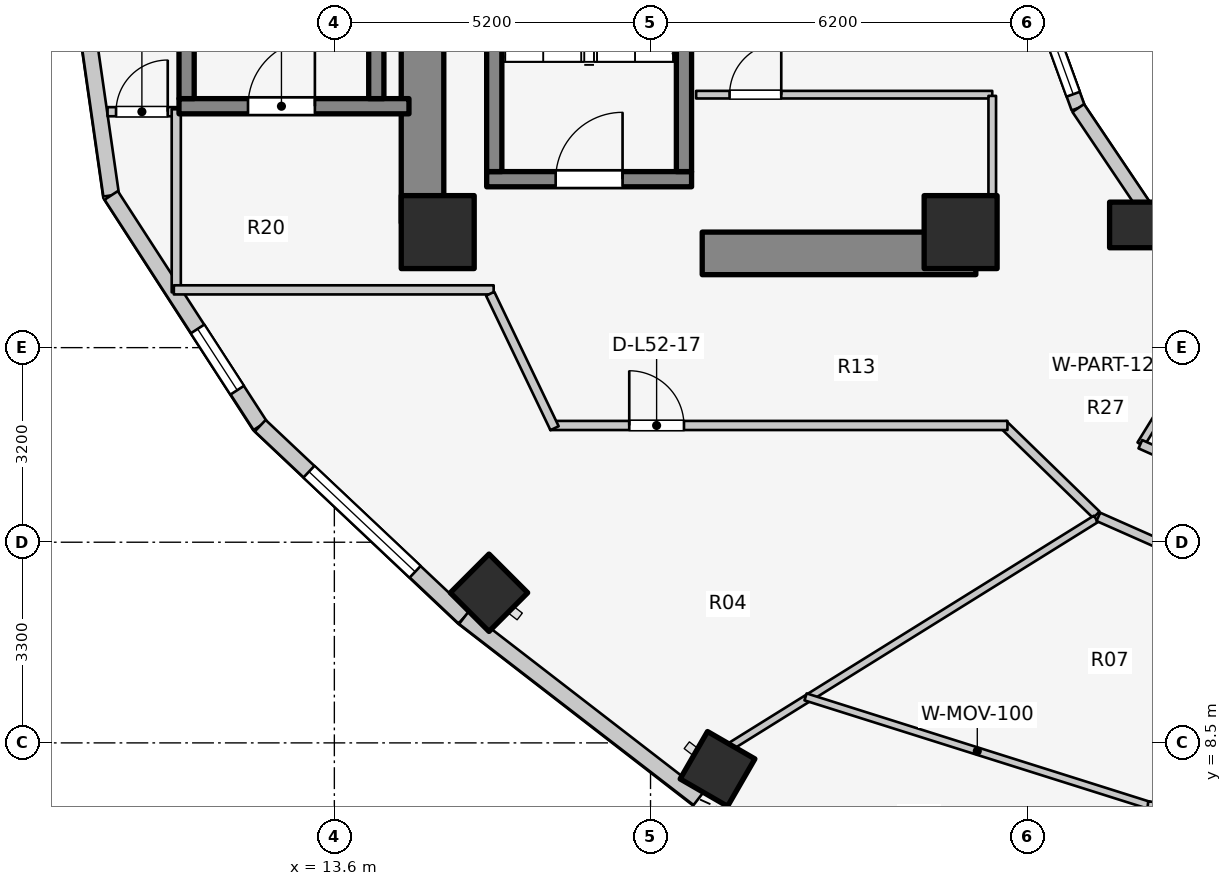
"""IFC4 building model, lengths in metres.
Left out: names, types, materials, properties, quantities, classifications, styles, units other than length and angle.
Written with IfcOpenShell. Run it as: python <this file> out.ifc"""

import sys

from ifc_helpers import new_model, si_unit, direction, frame, frame_2d, origin, origin_2d, place, context, subcontext, project, spatial, rectangle, extrude, element, fill, save


model = new_model("IFC4")
c1 = context("Model", 3, precision=1e-05, world=origin(), true_north=direction((0.0, 1.0)))
c2 = subcontext(c1, "Body", "Model", "MODEL_VIEW")
j1 = project(units=[si_unit("LENGTHUNIT", "METRE"), si_unit("PLANEANGLEUNIT", "RADIAN")], contexts=[c1])
p1 = place(None, origin())
s1 = spatial("IfcSite", under=j1, at=p1, CompositionType="ELEMENT")
p2 = place(p1, origin())
s2 = spatial("IfcBuilding", under=s1, at=p2, CompositionType="ELEMENT")
p3 = place(p2, frame((0.0, 0.0, 171.5)))
s3 = spatial("IfcBuildingStorey", under=s2, at=p3, CompositionType="ELEMENT", Elevation=171.5)
p4 = place(p3, frame((15.05, 17.05, 0.0), z_axis=(0.0, 0.0, 1.0), x_axis=(0.0, 1.0, 0.0)))
e1 = element("IfcWall", 1, at=p4, inside=s3, PredefinedType="SHEAR", context=c2, shape_type="SweptSolid", body=[
    extrude(rectangle(XDim=12.8, YDim=0.7, at=frame_2d((6.4, 0.0))), origin(), (0.0, 0.0, 1.0), 3.1),
])
p5 = place(p3, frame((19.65, 16.55, 0.0), z_axis=(0.0, 0.0, 1.0), x_axis=(1.0, 0.0, 0.0)))
e2 = element("IfcWall", 2, at=p5, inside=s3, PredefinedType="SHEAR", context=c2, shape_type="SweptSolid", body=[
    extrude(rectangle(XDim=4.5, YDim=0.7, at=frame_2d((2.25, 0.0))), origin(), (0.0, 0.0, 1.0), 3.1),
])
p6 = place(p3, frame((16.105, 17.77, 0.0), z_axis=(0.0, 0.0, 1.0), x_axis=(1.0, 0.0, 0.0)))
e3 = element("IfcWall", 3, at=p6, inside=s3, PredefinedType="SOLIDWALL", context=c2, shape_type="SweptSolid", body=[
    extrude(rectangle(XDim=3.37, YDim=0.25, at=frame_2d((1.685, 0.0))), origin(), (0.0, 0.0, 1.0), 3.1),
])
p7 = place(p6, frame((1.135, 0.0, 0.0)))
e4 = element("IfcOpeningElement", 4, at=p7, cuts=e3, PredefinedType="OPENING", context=c2, shape_type="SweptSolid", body=[
    extrude(rectangle(XDim=1.1, YDim=2.1, at=frame_2d((0.55, 1.05))), frame((0.0, 0.135, 0.0), z_axis=(0.0, -1.0, 0.0), x_axis=(1.0, 0.0, 0.0)), (0.0, 0.0, 1.0), 0.27),
])
for number, where, z_axis, x_axis in (
    (5, (16.23, 17.895, 0.0), (0.0, 0.0, 1.0), (0.0, 1.0, 0.0)),
    (6, (19.35, 17.895, 0.0), (0.0, 0.0, 1.0), (0.0, 1.0, 0.0)),
):
    element("IfcWall", number, at=place(p3, frame(where, z_axis=z_axis, x_axis=x_axis)), inside=s3, PredefinedType="SOLIDWALL", context=c2, shape_type="SweptSolid", body=[
        extrude(rectangle(XDim=7.81, YDim=0.25, at=frame_2d((3.905, 0.0))), origin(), (0.0, 0.0, 1.0), 3.1),
    ])
p8 = place(p3, frame((11.045, 18.97, 0.0), z_axis=(0.0, 0.0, 1.0), x_axis=(1.0, 0.0, 0.0)))
e7 = element("IfcWall", 7, at=p8, inside=s3, PredefinedType="SOLIDWALL", context=c2, shape_type="SweptSolid", body=[
    extrude(rectangle(XDim=3.782, YDim=0.25, at=frame_2d((1.891, 0.0))), origin(), (0.0, 0.0, 1.0), 3.1),
])
p9 = place(p8, frame((1.135, 0.0, 0.0)))
e8 = element("IfcOpeningElement", 8, at=p9, cuts=e7, PredefinedType="OPENING", context=c2, shape_type="SweptSolid", body=[
    extrude(rectangle(XDim=1.1, YDim=2.1, at=frame_2d((0.55, 1.05))), frame((0.0, 0.135, 0.0), z_axis=(0.0, -1.0, 0.0), x_axis=(1.0, 0.0, 0.0)), (0.0, 0.0, 1.0), 0.27),
])
for number, where, z_axis, x_axis in (
    (9, (11.17, 19.095, 0.0), (0.0, 0.0, 1.0), (0.0, 1.0, 0.0)),
    (10, (14.29, 19.095, 0.0), (0.0, 0.0, 1.0), (0.0, 1.0, 0.0)),
):
    element("IfcWall", number, at=place(p3, frame(where, z_axis=z_axis, x_axis=x_axis)), inside=s3, PredefinedType="SOLIDWALL", context=c2, shape_type="SweptSolid", body=[
        extrude(rectangle(XDim=7.81, YDim=0.25, at=frame_2d((3.905, 0.0))), origin(), (0.0, 0.0, 1.0), 3.1),
    ])
for number, where, z_axis, x_axis in (
    (11, (15.3, 16.9, 0.0), (0.0, 0.0, 1.0), (1.0, 0.0, 0.0)),
    (12, (23.9, 16.9, 0.0), (0.0, 0.0, 1.0), (1.0, 0.0, 0.0)),
):
    element("IfcColumn", number, at=place(p3, frame(where, z_axis=z_axis, x_axis=x_axis)), inside=s3, PredefinedType="COLUMN", context=c2, shape_type="SweptSolid", body=[
        extrude(rectangle(XDim=1.2, YDim=1.2, at=origin_2d()), origin(), (0.0, 0.0, 1.0), 3.1),
    ])
p10 = place(p3, frame((26.725, 17.018, 0.0), z_axis=(0.0, 0.0, 1.0), x_axis=(1.0, 0.0, 0.0)))
e13 = element("IfcColumn", 13, at=p10, inside=s3, PredefinedType="COLUMN", context=c2, shape_type="SweptSolid", body=[
    extrude(rectangle(XDim=0.75, YDim=0.75, at=origin_2d()), origin(), (0.0, 0.0, 1.0), 3.1),
])
for number, where, z_axis, x_axis in (
    (14, (16.143, 10.969, 0.0), (0.0, 0.0, 1.0), (-0.707, -0.707, 0.0)),
    (15, (19.902, 8.072, 0.0), (0.0, 0.0, 1.0), (-0.5, -0.866, 0.0)),
):
    element("IfcColumn", number, at=place(p3, frame(where, z_axis=z_axis, x_axis=x_axis)), inside=s3, PredefinedType="COLUMN", context=c2, shape_type="SweptSolid", body=[
        extrude(rectangle(XDim=0.9, YDim=0.9, at=origin_2d()), origin(), (0.0, 0.0, 1.0), 3.1),
    ])
p11 = place(p3, frame((25.123, 20.898, 0.0), z_axis=(0.0, 0.0, 1.0), x_axis=(0.341423187295, -0.93990968033, 0.0)))
e16 = element("IfcWall", 16, at=p11, inside=s3, PredefinedType="STANDARD", context=c2, shape_type="SweptSolid", body=[
    extrude(rectangle(XDim=2.084, YDim=0.23, at=frame_2d((1.042, 0.0))), origin(), (0.0, 0.0, 1.0), 2.84),
])
p12 = place(p11, frame((0.242, 0.0, 0.85)))
e17 = element("IfcOpeningElement", 17, at=p12, cuts=e16, PredefinedType="OPENING", context=c2, shape_type="SweptSolid", body=[
    extrude(rectangle(XDim=1.6, YDim=1.65, at=frame_2d((0.8, 0.825))), frame((0.0, 0.125, 0.0), z_axis=(0.0, -1.0, 0.0), x_axis=(1.0, 0.0, 0.0)), (0.0, 0.0, 1.0), 0.25),
])
p13 = place(p3, frame((25.834, 18.94, 0.0), z_axis=(0.0, 0.0, 1.0), x_axis=(0.558197800898, -0.829707909492, 0.0)))
e18 = element("IfcWall", 18, at=p13, inside=s3, PredefinedType="STANDARD", context=c2, shape_type="SweptSolid", body=[
    extrude(rectangle(XDim=2.027, YDim=0.23, at=frame_2d((1.013, 0.0))), origin(), (0.0, 0.0, 1.0), 2.16),
])
p14 = place(p3, frame((26.965, 17.258, 0.0), z_axis=(0.0, 0.0, 1.0), x_axis=(0.752576694707, -0.658504607869, 0.0)))
e19 = element("IfcWall", 19, at=p14, inside=s3, PredefinedType="STANDARD", context=c2, shape_type="SweptSolid", body=[
    extrude(rectangle(XDim=1.959, YDim=0.23, at=frame_2d((0.98, 0.0))), origin(), (0.0, 0.0, 1.0), 2.16),
])
p15 = place(p3, frame((9.14, 23.0, 0.0), z_axis=(0.0, 0.0, 1.0), x_axis=(0.142227632286, -0.989833976288, 0.0)))
e20 = element("IfcWall", 20, at=p15, inside=s3, PredefinedType="STANDARD", context=c2, shape_type="SweptSolid", body=[
    extrude(rectangle(XDim=5.553, YDim=0.26, at=frame_2d((2.776, 0.0))), origin(), (0.0, 0.0, 1.0), 2.85),
])
p16 = place(p15, frame((1.506, 0.0, 0.75)))
e21 = element("IfcOpeningElement", 21, at=p16, cuts=e20, PredefinedType="OPENING", context=c2, shape_type="SweptSolid", body=[
    extrude(rectangle(XDim=1.2, YDim=1.5, at=frame_2d((0.6, 0.75))), frame((0.0, 0.14, 0.0), z_axis=(0.0, -1.0, 0.0), x_axis=(1.0, 0.0, 0.0)), (0.0, 0.0, 1.0), 0.28),
])
p17 = place(p3, frame((9.93, 17.503, 0.0), z_axis=(0.0, 0.0, 1.0), x_axis=(0.543358984534, -0.839500454989, 0.0)))
e22 = element("IfcWall", 22, at=p17, inside=s3, PredefinedType="STANDARD", context=c2, shape_type="SweptSolid", body=[
    extrude(rectangle(XDim=4.511, YDim=0.26, at=frame_2d((2.256, 0.0))), origin(), (0.0, 0.0, 1.0), 2.85),
])
p18 = place(p17, frame((2.615, 0.0, 0.75)))
e23 = element("IfcOpeningElement", 23, at=p18, cuts=e22, PredefinedType="OPENING", context=c2, shape_type="SweptSolid", body=[
    extrude(rectangle(XDim=1.2, YDim=1.5, at=frame_2d((0.6, 0.75))), frame((0.0, 0.14, 0.0), z_axis=(0.0, -1.0, 0.0), x_axis=(1.0, 0.0, 0.0)), (0.0, 0.0, 1.0), 0.28),
])
p19 = place(p3, frame((12.381, 13.716, 0.0), z_axis=(0.0, 0.0, 1.0), x_axis=(0.727667301037, -0.68593024354, 0.0)))
e24 = element("IfcWall", 24, at=p19, inside=s3, PredefinedType="STANDARD", context=c2, shape_type="SweptSolid", body=[
    extrude(rectangle(XDim=4.604, YDim=0.26, at=frame_2d((2.302, 0.0))), origin(), (0.0, 0.0, 1.0), 2.85),
])
p20 = place(p19, frame((1.102, 0.0, 0.75)))
e25 = element("IfcOpeningElement", 25, at=p20, cuts=e24, PredefinedType="OPENING", context=c2, shape_type="SweptSolid", body=[
    extrude(rectangle(XDim=2.4, YDim=1.7, at=frame_2d((1.2, 0.85))), frame((0.0, 0.14, 0.0), z_axis=(0.0, -1.0, 0.0), x_axis=(1.0, 0.0, 0.0)), (0.0, 0.0, 1.0), 0.28),
])
p21 = place(p3, frame((15.731, 10.559, 0.0), z_axis=(0.0, 0.0, 1.0), x_axis=(0.791460185804, -0.611220724687, 0.0)))
e26 = element("IfcWall", 26, at=p21, inside=s3, PredefinedType="STANDARD", context=c2, shape_type="SweptSolid", body=[
    extrude(rectangle(XDim=4.872, YDim=0.26, at=frame_2d((2.436, 0.0))), origin(), (0.0, 0.0, 1.0), 2.85),
])
p22 = place(p3, frame((19.55, 19.16, 0.0), z_axis=(0.0, 0.0, 1.0), x_axis=(1.0, 0.0, 0.0)))
e27 = element("IfcWall", 27, at=p22, inside=s3, PredefinedType="PARTITIONING", context=c2, shape_type="SweptSolid", body=[
    extrude(rectangle(XDim=4.87, YDim=0.125, at=frame_2d((2.435, 0.0))), origin(), (0.0, 0.0, 1.0), 2.12),
])
p23 = place(p22, frame((0.55, 0.0, 0.0)))
e28 = element("IfcOpeningElement", 28, at=p23, cuts=e27, PredefinedType="OPENING", context=c2, shape_type="SweptSolid", body=[
    extrude(rectangle(XDim=0.85, YDim=2.05, at=frame_2d((0.425, 1.025))), frame((0.0, 0.073, 0.0), z_axis=(0.0, -1.0, 0.0), x_axis=(1.0, 0.0, 0.0)), (0.0, 0.0, 1.0), 0.145),
])
p24 = place(p3, frame((24.42, 17.1, 0.0), z_axis=(0.0, 0.0, 1.0), x_axis=(0.0, 1.0, 0.0)))
e29 = element("IfcWall", 29, at=p24, inside=s3, PredefinedType="PARTITIONING", context=c2, shape_type="SweptSolid", body=[
    extrude(rectangle(XDim=2.04, YDim=0.125, at=frame_2d((1.02, 0.0))), origin(), (0.0, 0.0, 1.0), 2.232),
])
p25 = place(p3, frame((9.87, 18.88, 0.0), z_axis=(0.0, 0.0, 1.0), x_axis=(1.0, 0.0, 0.0)))
e30 = element("IfcWall", 30, at=p25, inside=s3, PredefinedType="PARTITIONING", context=c2, shape_type="SweptSolid", body=[
    extrude(rectangle(XDim=1.17, YDim=0.15, at=frame_2d((0.585, 0.0))), origin(), (0.0, 0.0, 1.0), 2.855),
])
p26 = place(p25, frame((0.14, 0.0, 0.0)))
e31 = element("IfcOpeningElement", 31, at=p26, cuts=e30, PredefinedType="OPENING", context=c2, shape_type="SweptSolid", body=[
    extrude(rectangle(XDim=0.85, YDim=2.05, at=frame_2d((0.425, 1.025))), frame((0.0, 0.085, 0.0), z_axis=(0.0, -1.0, 0.0), x_axis=(1.0, 0.0, 0.0)), (0.0, 0.0, 1.0), 0.17),
])
p27 = place(p3, frame((11.0, 15.91, 0.0), z_axis=(0.0, 0.0, 1.0), x_axis=(0.0, 1.0, 0.0)))
e32 = element("IfcWall", 32, at=p27, inside=s3, PredefinedType="PARTITIONING", context=c2, shape_type="SweptSolid", body=[
    extrude(rectangle(XDim=3.01, YDim=0.15, at=frame_2d((1.505, 0.0))), origin(), (0.0, 0.0, 1.0), 2.855),
])
p28 = place(p3, frame((10.96, 15.95, 0.0), z_axis=(0.0, 0.0, 1.0), x_axis=(1.0, 0.0, 0.0)))
e33 = element("IfcWall", 33, at=p28, inside=s3, PredefinedType="PARTITIONING", context=c2, shape_type="SweptSolid", body=[
    extrude(rectangle(XDim=5.26, YDim=0.15, at=frame_2d((2.63, 0.0))), origin(), (0.0, 0.0, 1.0), 2.22),
])
p29 = place(p3, frame((26.133, 12.251, 0.0), z_axis=(0.0, 0.0, 1.0), x_axis=(-0.717419568599, 0.696641344302, 0.0)))
e34 = element("IfcWall", 34, at=p29, inside=s3, PredefinedType="PARTITIONING", context=c2, shape_type="SweptSolid", body=[
    extrude(rectangle(XDim=2.138, YDim=0.15, at=frame_2d((1.069, 0.0))), origin(), (0.0, 0.0, 1.0), 2.299),
])
p30 = place(p3, frame((17.15, 13.72, 0.0), z_axis=(0.0, 0.0, 1.0), x_axis=(1.0, 0.0, 0.0)))
e35 = element("IfcWall", 35, at=p30, inside=s3, PredefinedType="PARTITIONING", context=c2, shape_type="SweptSolid", body=[
    extrude(rectangle(XDim=7.52, YDim=0.15, at=frame_2d((3.76, 0.0))), origin(), (0.0, 0.0, 1.0), 2.299),
])
p31 = place(p30, frame((1.3, 0.0, 0.0)))
e36 = element("IfcOpeningElement", 36, at=p31, cuts=e35, PredefinedType="OPENING", context=c2, shape_type="SweptSolid", body=[
    extrude(rectangle(XDim=0.9, YDim=2.1, at=frame_2d((0.45, 1.05))), frame((0.0, 0.085, 0.0), z_axis=(0.0, -1.0, 0.0), x_axis=(1.0, 0.0, 0.0)), (0.0, 0.0, 1.0), 0.17),
])
p32 = place(p3, frame((17.222, 13.675, 0.0), z_axis=(0.0, 0.0, 1.0), x_axis=(-0.431973389813, 0.901886351207, 0.0)))
e37 = element("IfcWall", 37, at=p32, inside=s3, PredefinedType="PARTITIONING", context=c2, shape_type="SweptSolid", body=[
    extrude(rectangle(XDim=2.452, YDim=0.15, at=frame_2d((1.226, 0.0))), origin(), (0.0, 0.0, 1.0), 2.855),
])
p33 = place(p3, frame((28.45, 15.985, 0.0), z_axis=(0.0, 0.0, 1.0), x_axis=(-0.524565340045, -0.851370192116, 0.0)))
e38 = element("IfcWall", 38, at=p33, inside=s3, PredefinedType="PARTITIONING", context=c2, shape_type="SweptSolid", body=[
    extrude(rectangle(XDim=3.027, YDim=0.125, at=frame_2d((1.514, 0.0))), origin(), (0.0, 0.0, 1.0), 2.299),
])
p34 = place(p3, frame((26.856, 13.412, 0.0), z_axis=(0.0, 0.0, 1.0), x_axis=(0.912985265053, -0.407992531545, 0.0)))
e39 = element("IfcWall", 39, at=p34, inside=s3, PredefinedType="PARTITIONING", context=c2, shape_type="SweptSolid", body=[
    extrude(rectangle(XDim=2.723, YDim=0.15, at=frame_2d((1.362, 0.0))), origin(), (0.0, 0.0, 1.0), 2.299),
])
p35 = place(p3, frame((26.125, 12.184, 0.0), z_axis=(0.0, 0.0, 1.0), x_axis=(-0.849008457073, -0.528379257559, 0.0)))
e40 = element("IfcWall", 40, at=p35, inside=s3, PredefinedType="PARTITIONING", context=c2, shape_type="SweptSolid", body=[
    extrude(rectangle(XDim=7.077, YDim=0.125, at=frame_2d((3.539, 0.0))), origin(), (0.0, 0.0, 1.0), 2.299),
])
p36 = place(p3, frame((21.35, 9.256, 0.0), z_axis=(0.0, 0.0, 1.0), x_axis=(0.953651169296, -0.300914352101, 0.0)))
e41 = element("IfcWall", 41, at=p36, inside=s3, PredefinedType="MOVABLE", context=c2, shape_type="SweptSolid", body=[
    extrude(rectangle(XDim=5.923, YDim=0.12, at=frame_2d((2.961, 0.0))), origin(), (0.0, 0.0, 1.0), 2.299),
])
p37 = place(p3, frame((26.979, 7.478, 0.0), z_axis=(0.0, 0.0, 1.0), x_axis=(0.994082114435, -0.108631255906, 0.0)))
e42 = element("IfcWall", 42, at=p37, inside=s3, PredefinedType="MOVABLE", context=c2, shape_type="SweptSolid", body=[
    extrude(rectangle(XDim=5.061, YDim=0.12, at=frame_2d((2.531, 0.0))), origin(), (0.0, 0.0, 1.0), 2.299),
])
p38 = place(p37, frame((2.056, 0.0, 0.0)))
e43 = element("IfcOpeningElement", 43, at=p38, cuts=e42, PredefinedType="OPENING", context=c2, shape_type="SweptSolid", body=[
    extrude(rectangle(XDim=0.95, YDim=2.1, at=frame_2d((0.475, 1.05))), frame((0.0, 0.07, 0.0), z_axis=(0.0, -1.0, 0.0), x_axis=(1.0, 0.0, 0.0)), (0.0, 0.0, 1.0), 0.14),
])
p39 = place(p3, frame((26.165, 12.217, 0.0), z_axis=(0.0, 0.0, 1.0), x_axis=(0.91445214467, -0.404694051239, 0.0)))
e44 = element("IfcWall", 44, at=p39, inside=s3, PredefinedType="PARTITIONING", context=c2, shape_type="SweptSolid", body=[
    extrude(rectangle(XDim=3.091, YDim=0.15, at=frame_2d((1.545, 0.0))), origin(), (0.0, 0.0, 1.0), 2.299),
])
p40 = place(p12, origin())
e45 = element("IfcWindow", 45, at=p40, inside=s3, PartitioningType="SINGLE_PANEL", PredefinedType="WINDOW", context=c2, shape_type="SweptSolid", body=[
    extrude(rectangle(XDim=1.6, YDim=1.65, at=frame_2d((0.8, 0.825))), frame((0.0, 0.03, 0.0), z_axis=(0.0, -1.0, 0.0), x_axis=(1.0, 0.0, 0.0)), (0.0, 0.0, 1.0), 0.06),
])
fill(e17, e45)
p41 = place(p18, origin())
e46 = element("IfcWindow", 46, at=p41, inside=s3, PartitioningType="SINGLE_PANEL", PredefinedType="WINDOW", context=c2, shape_type="SweptSolid", body=[
    extrude(rectangle(XDim=1.2, YDim=1.5, at=frame_2d((0.6, 0.75))), frame((0.0, 0.03, 0.0), z_axis=(0.0, -1.0, 0.0), x_axis=(1.0, 0.0, 0.0)), (0.0, 0.0, 1.0), 0.06),
])
fill(e23, e46)
p42 = place(p20, origin())
e47 = element("IfcWindow", 47, at=p42, inside=s3, PartitioningType="SINGLE_PANEL", PredefinedType="WINDOW", context=c2, shape_type="SweptSolid", body=[
    extrude(rectangle(XDim=2.4, YDim=1.7, at=frame_2d((1.2, 0.85))), frame((0.0, 0.03, 0.0), z_axis=(0.0, -1.0, 0.0), x_axis=(1.0, 0.0, 0.0)), (0.0, 0.0, 1.0), 0.06),
])
fill(e25, e47)
p43 = place(p7, origin())
e48 = element("IfcDoor", 48, at=p43, inside=s3, OperationType="SINGLE_SWING_RIGHT", PredefinedType="DOOR", context=c2, shape_type="SweptSolid", body=[
    extrude(rectangle(XDim=1.1, YDim=2.1, at=frame_2d((0.55, 1.05))), frame((0.0, 0.025, 0.0), z_axis=(0.0, -1.0, 0.0), x_axis=(1.0, 0.0, 0.0)), (0.0, 0.0, 1.0), 0.05),
])
fill(e4, e48)
p44 = place(p9, origin())
e49 = element("IfcDoor", 49, at=p44, inside=s3, OperationType="SINGLE_SWING_RIGHT", PredefinedType="DOOR", context=c2, shape_type="SweptSolid", body=[
    extrude(rectangle(XDim=1.1, YDim=2.1, at=frame_2d((0.55, 1.05))), frame((0.0, 0.025, 0.0), z_axis=(0.0, -1.0, 0.0), x_axis=(1.0, 0.0, 0.0)), (0.0, 0.0, 1.0), 0.05),
])
fill(e8, e49)
p45 = place(p23, origin())
e50 = element("IfcDoor", 50, at=p45, inside=s3, OperationType="SINGLE_SWING_RIGHT", PredefinedType="DOOR", context=c2, shape_type="SweptSolid", body=[
    extrude(rectangle(XDim=0.85, YDim=2.05, at=frame_2d((0.425, 1.025))), frame((0.0, 0.025, 0.0), z_axis=(0.0, -1.0, 0.0), x_axis=(1.0, 0.0, 0.0)), (0.0, 0.0, 1.0), 0.05),
])
fill(e28, e50)
p46 = place(p26, origin())
e51 = element("IfcDoor", 51, at=p46, inside=s3, OperationType="SINGLE_SWING_RIGHT", PredefinedType="DOOR", context=c2, shape_type="SweptSolid", body=[
    extrude(rectangle(XDim=0.85, YDim=2.05, at=frame_2d((0.425, 1.025))), frame((0.0, 0.025, 0.0), z_axis=(0.0, -1.0, 0.0), x_axis=(1.0, 0.0, 0.0)), (0.0, 0.0, 1.0), 0.05),
])
fill(e31, e51)
p47 = place(p31, origin())
e52 = element("IfcDoor", 52, at=p47, inside=s3, OperationType="SINGLE_SWING_LEFT", PredefinedType="DOOR", context=c2, shape_type="SweptSolid", body=[
    extrude(rectangle(XDim=0.9, YDim=2.1, at=frame_2d((0.45, 1.05))), frame((0.0, 0.025, 0.0), z_axis=(0.0, -1.0, 0.0), x_axis=(1.0, 0.0, 0.0)), (0.0, 0.0, 1.0), 0.05),
])
fill(e36, e52)
save(model, sys.argv[1])
